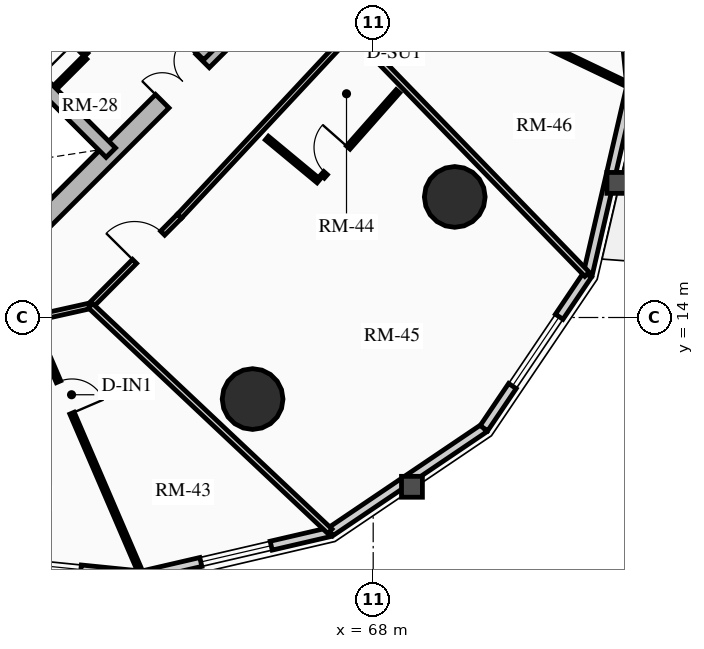
"""IFC4 building model, lengths in metres.
Left out: names, types, materials, properties, quantities, classifications, styles, units other than length and angle.
Written with IfcOpenShell. Run it as: python <this file> out.ifc"""

import sys

from ifc_helpers import new_model, si_unit, direction, frame, frame_2d, origin, origin_2d, place, context, subcontext, project, spatial, rectangle, circle, extrude, source, transform, mapped, element, fill, save


model = new_model("IFC4")
c1 = context("Model", 3, precision=1e-05, world=origin(), true_north=direction((0.0, 1.0)))
c2 = subcontext(c1, "Body", "Model", "MODEL_VIEW")
j1 = project(units=[si_unit("LENGTHUNIT", "METRE"), si_unit("PLANEANGLEUNIT", "RADIAN")], contexts=[c1])
p1 = place(None, origin())
s1 = spatial("IfcSite", under=j1, at=p1, CompositionType="ELEMENT")
p2 = place(p1, origin())
s2 = spatial("IfcBuilding", under=s1, at=p2, CompositionType="ELEMENT")
p3 = place(p2, frame((0.0, 0.0, 33.64)))
s3 = spatial("IfcBuildingStorey", under=s2, at=p3, CompositionType="ELEMENT", Elevation=33.64)
p4 = place(p3, frame((58.596, 15.838, 0.0), z_axis=(0.0, 0.0, 1.0), x_axis=(0.707106781187, 0.707106781187, 0.0)))
e1 = element("IfcWall", 1, at=p4, inside=s3, PredefinedType="SHEAR", context=c2, shape_type="SweptSolid", body=[
    extrude(rectangle(XDim=10.7, YDim=0.5, at=frame_2d((5.35, 0.0))), origin(), (0.0, 0.0, 1.0), 2.91),
])
m1 = source(origin(), c2, "Body", "SweptSolid", [
    extrude(rectangle(XDim=1.5, YDim=2.02, at=frame_2d((0.75, 1.01))), frame((0.0, 0.26, 0.0), z_axis=(0.0, -1.0, 0.0), x_axis=(1.0, 0.0, 0.0)), (0.0, 0.0, 1.0), 0.52),
])
p5 = place(p4, frame((5.45, 0.0, 0.0)))
e2 = element("IfcOpeningElement", 2, at=p5, cuts=e1, PredefinedType="OPENING", context=c2, shape_type="MappedRepresentation", body=[
    mapped(m1, transform((0.0, 0.0, 0.0), x_axis=(1.0, 0.0, 0.0), y_axis=(0.0, 1.0, 0.0), z_axis=(0.0, 0.0, 1.0), scale=1.0)),
])
p6 = place(p3, frame((61.096, 18.338, 0.0), z_axis=(0.0, 0.0, 1.0), x_axis=(-0.707106781187, 0.707106781187, 0.0)))
e3 = element("IfcWall", 3, at=p6, inside=s3, PredefinedType="SHEAR", context=c2, shape_type="SweptSolid", body=[
    extrude(rectangle(XDim=13.8, YDim=0.35, at=frame_2d((6.9, 0.0))), origin(), (0.0, 0.0, 1.0), 2.91),
])
m2 = source(origin(), c2, "Body", "SweptSolid", [
    extrude(rectangle(XDim=1.1, YDim=2.015, at=frame_2d((0.55, 1.007))), frame((0.0, 0.185, 0.0), z_axis=(0.0, -1.0, 0.0), x_axis=(1.0, 0.0, 0.0)), (0.0, 0.0, 1.0), 0.37),
])
p7 = place(p6, frame((4.9, 0.0, 0.0)))
e4 = element("IfcOpeningElement", 4, at=p7, cuts=e3, PredefinedType="OPENING", context=c2, shape_type="MappedRepresentation", body=[
    mapped(m2, transform((0.0, 0.0, 0.0), x_axis=(1.0, 0.0, 0.0), y_axis=(0.0, 1.0, 0.0), z_axis=(0.0, 0.0, 1.0), scale=1.0)),
])
m3 = source(origin(), c2, "Body", "SweptSolid", [
    extrude(rectangle(XDim=1.15, YDim=2.02, at=frame_2d((0.575, 1.01))), frame((0.0, 0.185, 0.0), z_axis=(0.0, -1.0, 0.0), x_axis=(1.0, 0.0, 0.0)), (0.0, 0.0, 1.0), 0.37),
])
p8 = place(p6, frame((7.32, 0.0, 0.0)))
e5 = element("IfcOpeningElement", 5, at=p8, cuts=e3, PredefinedType="OPENING", context=c2, shape_type="MappedRepresentation", body=[
    mapped(m3, transform((0.0, 0.0, 0.0), x_axis=(1.0, 0.0, 0.0), y_axis=(0.0, 1.0, 0.0), z_axis=(0.0, 0.0, 1.0), scale=1.0)),
])
p9 = place(p3, frame((63.662, 20.904, 0.0), z_axis=(0.0, 0.0, 1.0), x_axis=(-0.707106781187, 0.707106781187, 0.0)))
e6 = element("IfcWall", 6, at=p9, inside=s3, PredefinedType="SHEAR", context=c2, shape_type="SweptSolid", body=[
    extrude(rectangle(XDim=13.8, YDim=0.35, at=frame_2d((6.9, 0.0))), origin(), (0.0, 0.0, 1.0), 2.91),
])
p10 = place(p9, frame((10.025, 0.0, 0.0)))
e7 = element("IfcOpeningElement", 7, at=p10, cuts=e6, PredefinedType="OPENING", context=c2, shape_type="MappedRepresentation", body=[
    mapped(m2, transform((0.0, 0.0, 0.0), x_axis=(1.0, 0.0, 0.0), y_axis=(0.0, 1.0, 0.0), z_axis=(0.0, 0.0, 1.0), scale=1.0)),
])
p11 = place(p9, frame((12.025, 0.0, 0.0)))
e8 = element("IfcOpeningElement", 8, at=p11, cuts=e6, PredefinedType="OPENING", context=c2, shape_type="MappedRepresentation", body=[
    mapped(m2, transform((0.0, 0.0, 0.0), x_axis=(1.0, 0.0, 0.0), y_axis=(0.0, 1.0, 0.0), z_axis=(0.0, 0.0, 1.0), scale=1.0)),
])
p12 = place(p9, frame((5.33, 0.0, 0.0)))
e9 = element("IfcOpeningElement", 9, at=p12, cuts=e6, PredefinedType="OPENING", context=c2, shape_type="MappedRepresentation", body=[
    mapped(m3, transform((0.0, 0.0, 0.0), x_axis=(1.0, 0.0, 0.0), y_axis=(0.0, 1.0, 0.0), z_axis=(0.0, 0.0, 1.0), scale=1.0)),
])
for number, where, z_axis, x_axis in (
    (10, (64.827, 11.854, 0.0), (0.0, 0.0, 1.0), (1.0, 0.0, 0.0)),
    (11, (70.146, 17.173, 0.0), (0.0, 0.0, 1.0), (1.0, 0.0, 0.0)),
):
    element("IfcColumn", number, at=place(p3, frame(where, z_axis=z_axis, x_axis=x_axis)), inside=s3, PredefinedType="USERDEFINED", context=c2, shape_type="SweptSolid", body=[
        extrude(circle(Radius=0.8, at=origin_2d()), origin(), (0.0, 0.0, 1.0), 2.91),
    ])
p13 = place(p3, frame((61.91, 7.206, 0.0), z_axis=(0.0, 0.0, 1.0), x_axis=(-0.994968263437, 0.100190592135, 0.0)))
e12 = element("IfcWall", 12, at=p13, inside=s3, PredefinedType="SOLIDWALL", context=c2, shape_type="SweptSolid", body=[
    extrude(rectangle(XDim=5.419, YDim=0.24, at=frame_2d((2.71, 0.0))), origin(), (0.0, 0.0, 1.0), 2.073),
])
m4 = source(origin(), c2, "Body", "SweptSolid", [
    extrude(rectangle(XDim=2.2, YDim=1.35, at=frame_2d((1.1, 0.675))), frame((0.0, 0.13, 0.0), z_axis=(0.0, -1.0, 0.0), x_axis=(1.0, 0.0, 0.0)), (0.0, 0.0, 1.0), 0.26),
])
p14 = place(p13, frame((1.61, 0.0, 0.65)))
e13 = element("IfcOpeningElement", 13, at=p14, cuts=e12, PredefinedType="OPENING", context=c2, shape_type="MappedRepresentation", body=[
    mapped(m4, transform((0.0, 0.0, 0.0), x_axis=(1.0, 0.0, 0.0), y_axis=(0.0, 1.0, 0.0), z_axis=(0.0, 0.0, 1.0), scale=1.0)),
])
p15 = place(p3, frame((66.871, 8.356, 0.0), z_axis=(0.0, 0.0, 1.0), x_axis=(-0.974167686491, -0.22582585901, 0.0)))
e14 = element("IfcWall", 14, at=p15, inside=s3, PredefinedType="SOLIDWALL", context=c2, shape_type="SweptSolid", body=[
    extrude(rectangle(XDim=5.092, YDim=0.24, at=frame_2d((2.546, 0.0))), origin(), (0.0, 0.0, 1.0), 2.073),
])
m5 = source(origin(), c2, "Body", "SweptSolid", [
    extrude(rectangle(XDim=1.9, YDim=1.35, at=frame_2d((0.95, 0.675))), frame((0.0, 0.13, 0.0), z_axis=(0.0, -1.0, 0.0), x_axis=(1.0, 0.0, 0.0)), (0.0, 0.0, 1.0), 0.26),
])
p16 = place(p15, frame((1.596, 0.0, 0.65)))
e15 = element("IfcOpeningElement", 15, at=p16, cuts=e14, PredefinedType="OPENING", context=c2, shape_type="MappedRepresentation", body=[
    mapped(m5, transform((0.0, 0.0, 0.0), x_axis=(1.0, 0.0, 0.0), y_axis=(0.0, 1.0, 0.0), z_axis=(0.0, 0.0, 1.0), scale=1.0)),
])
p17 = place(p3, frame((70.914, 11.086, 0.0), z_axis=(0.0, 0.0, 1.0), x_axis=(-0.828748297084, -0.559621532896, 0.0)))
e16 = element("IfcWall", 16, at=p17, inside=s3, PredefinedType="SOLIDWALL", context=c2, shape_type="SweptSolid", body=[
    extrude(rectangle(XDim=4.879, YDim=0.24, at=frame_2d((2.439, 0.0))), origin(), (0.0, 0.0, 1.0), 2.073),
])
p18 = place(p3, frame((73.644, 15.129, 0.0), z_axis=(0.0, 0.0, 1.0), x_axis=(-0.559621532896, -0.828748297084, 0.0)))
e17 = element("IfcWall", 17, at=p18, inside=s3, PredefinedType="SOLIDWALL", context=c2, shape_type="SweptSolid", body=[
    extrude(rectangle(XDim=4.879, YDim=0.24, at=frame_2d((2.439, 0.0))), origin(), (0.0, 0.0, 1.0), 2.073),
])
p19 = place(p18, frame((1.339, 0.0, 0.65)))
e18 = element("IfcOpeningElement", 18, at=p19, cuts=e17, PredefinedType="OPENING", context=c2, shape_type="MappedRepresentation", body=[
    mapped(m4, transform((0.0, 0.0, 0.0), x_axis=(1.0, 0.0, 0.0), y_axis=(0.0, 1.0, 0.0), z_axis=(0.0, 0.0, 1.0), scale=1.0)),
])
p20 = place(p3, frame((74.794, 20.09, 0.0), z_axis=(0.0, 0.0, 1.0), x_axis=(-0.22582585901, -0.974167686491, 0.0)))
e19 = element("IfcWall", 19, at=p20, inside=s3, PredefinedType="SOLIDWALL", context=c2, shape_type="SweptSolid", body=[
    extrude(rectangle(XDim=5.092, YDim=0.24, at=frame_2d((2.546, 0.0))), origin(), (0.0, 0.0, 1.0), 2.073),
])
p21 = place(p3, frame((74.251, 25.482, 0.0), z_axis=(0.0, 0.0, 1.0), x_axis=(0.100190592135, -0.994968263437, 0.0)))
e20 = element("IfcWall", 20, at=p21, inside=s3, PredefinedType="SOLIDWALL", context=c2, shape_type="SweptSolid", body=[
    extrude(rectangle(XDim=5.419, YDim=0.24, at=frame_2d((2.71, 0.0))), origin(), (0.0, 0.0, 1.0), 2.073),
])
p22 = place(p21, frame((1.76, 0.0, 0.65)))
e21 = element("IfcOpeningElement", 21, at=p22, cuts=e20, PredefinedType="OPENING", context=c2, shape_type="MappedRepresentation", body=[
    mapped(m5, transform((0.0, 0.0, 0.0), x_axis=(1.0, 0.0, 0.0), y_axis=(0.0, 1.0, 0.0), z_axis=(0.0, 0.0, 1.0), scale=1.0)),
])
p23 = place(p3, frame((60.448, 20.915, 0.0), z_axis=(0.0, 0.0, 1.0), x_axis=(-0.707106781187, 0.707106781187, 0.0)))
e22 = element("IfcWall", 22, at=p23, inside=s3, PredefinedType="PARTITIONING", context=c2, shape_type="SweptSolid", body=[
    extrude(rectangle(XDim=1.87, YDim=0.125, at=frame_2d((0.935, 0.0))), origin(), (0.0, 0.0, 1.0), 2.635),
])
m6 = source(origin(), c2, "Body", "SweptSolid", [
    extrude(rectangle(XDim=0.9, YDim=2.005, at=frame_2d((0.45, 1.002))), frame((0.0, 0.073, 0.0), z_axis=(0.0, -1.0, 0.0), x_axis=(1.0, 0.0, 0.0)), (0.0, 0.0, 1.0), 0.145),
])
p24 = place(p23, frame((0.45, 0.0, 0.0)))
e23 = element("IfcOpeningElement", 23, at=p24, cuts=e22, PredefinedType="OPENING", context=c2, shape_type="MappedRepresentation", body=[
    mapped(m6, transform((0.0, 0.0, 0.0), x_axis=(1.0, 0.0, 0.0), y_axis=(0.0, 1.0, 0.0), z_axis=(0.0, 0.0, 1.0), scale=1.0)),
])
p25 = place(p3, frame((59.643, 20.066, 0.0), z_axis=(0.0, 0.0, 1.0), x_axis=(0.707106781187, 0.707106781187, 0.0)))
e24 = element("IfcWall", 24, at=p25, inside=s3, PredefinedType="PARTITIONING", context=c2, shape_type="SweptSolid", body=[
    extrude(rectangle(XDim=1.1, YDim=0.125, at=frame_2d((0.55, 0.0))), origin(), (0.0, 0.0, 1.0), 2.635),
])
p26 = place(p3, frame((59.008, 13.963, 0.0), z_axis=(0.0, 0.0, 1.0), x_axis=(0.976020856791, 0.21767702476, 0.0)))
e25 = element("IfcWall", 25, at=p26, inside=s3, PredefinedType="PARTITIONING", context=c2, shape_type="SweptSolid", body=[
    extrude(rectangle(XDim=1.593, YDim=0.15, at=frame_2d((0.796, 0.0))), origin(), (0.0, 0.0, 1.0), 2.205),
])
p27 = place(p3, frame((60.562, 14.31, 0.0), z_axis=(0.0, 0.0, 1.0), x_axis=(0.704566236161, 0.709638230975, 0.0)))
e26 = element("IfcWall", 26, at=p27, inside=s3, PredefinedType="PARTITIONING", context=c2, shape_type="SweptSolid", body=[
    extrude(rectangle(XDim=3.321, YDim=0.15, at=frame_2d((1.661, 0.0))), origin(), (0.0, 0.0, 1.0), 2.159),
])
m7 = source(origin(), c2, "Body", "SweptSolid", [
    extrude(rectangle(XDim=1.05, YDim=2.015, at=frame_2d((0.525, 1.007))), frame((0.0, 0.085, 0.0), z_axis=(0.0, -1.0, 0.0), x_axis=(1.0, 0.0, 0.0)), (0.0, 0.0, 1.0), 0.17),
])
p28 = place(p27, frame((1.643, 0.0, 0.0)))
e27 = element("IfcOpeningElement", 27, at=p28, cuts=e26, PredefinedType="OPENING", context=c2, shape_type="MappedRepresentation", body=[
    mapped(m7, transform((0.0, 0.0, 0.0), x_axis=(1.0, 0.0, 0.0), y_axis=(0.0, 1.0, 0.0), z_axis=(0.0, 0.0, 1.0), scale=1.0)),
])
p29 = place(p3, frame((62.903, 16.667, 0.0), z_axis=(0.0, 0.0, 1.0), x_axis=(0.682371947497, 0.731005147225, 0.0)))
e28 = element("IfcWall", 28, at=p29, inside=s3, PredefinedType="PARTITIONING", context=c2, shape_type="SweptSolid", body=[
    extrude(rectangle(XDim=6.642, YDim=0.15, at=frame_2d((3.321, 0.0))), origin(), (0.0, 0.0, 1.0), 2.159),
])
p30 = place(p3, frame((60.562, 14.31, 0.0), z_axis=(0.0, 0.0, 1.0), x_axis=(0.727781661561, -0.685808904211, 0.0)))
e29 = element("IfcWall", 29, at=p30, inside=s3, PredefinedType="PARTITIONING", context=c2, shape_type="SweptSolid", body=[
    extrude(rectangle(XDim=8.655, YDim=0.16, at=frame_2d((4.328, 0.0))), origin(), (0.0, 0.0, 1.0), 2.073),
])
p31 = place(p3, frame((67.435, 21.521, 0.0), z_axis=(0.0, 0.0, 1.0), x_axis=(0.6962628802, -0.717786877601, 0.0)))
e30 = element("IfcWall", 30, at=p31, inside=s3, PredefinedType="PARTITIONING", context=c2, shape_type="SweptSolid", body=[
    extrude(rectangle(XDim=8.893, YDim=0.16, at=frame_2d((4.446, 0.0))), origin(), (0.0, 0.0, 1.0), 2.073),
])
p32 = place(p3, frame((59.008, 13.963, 0.0), z_axis=(0.0, 0.0, 1.0), x_axis=(0.395256697593, -0.918570706592, 0.0)))
e31 = element("IfcWall", 31, at=p32, inside=s3, PredefinedType="PARTITIONING", context=c2, shape_type="SweptSolid", body=[
    extrude(rectangle(XDim=7.334, YDim=0.125, at=frame_2d((3.667, 0.0))), origin(), (0.0, 0.0, 1.0), 2.073),
])
p33 = place(p32, frame((1.8, 0.0, 0.0)))
e32 = element("IfcOpeningElement", 32, at=p33, cuts=e31, PredefinedType="OPENING", context=c2, shape_type="MappedRepresentation", body=[
    mapped(m6, transform((0.0, 0.0, 0.0), x_axis=(1.0, 0.0, 0.0), y_axis=(0.0, 1.0, 0.0), z_axis=(0.0, 0.0, 1.0), scale=1.0)),
])
p34 = place(p3, frame((65.202, 18.721, 0.0), z_axis=(0.0, 0.0, 1.0), x_axis=(0.769814202386, -0.638268042287, 0.0)))
e33 = element("IfcWall", 33, at=p34, inside=s3, PredefinedType="PARTITIONING", context=c2, shape_type="SweptSolid", body=[
    extrude(rectangle(XDim=1.769, YDim=0.125, at=frame_2d((0.884, 0.0))), origin(), (0.0, 0.0, 1.0), 2.635),
])
p35 = place(p3, frame((66.667, 17.709, 0.0), z_axis=(0.0, 0.0, 1.0), x_axis=(0.662510581678, 0.749052554341, 0.0)))
e34 = element("IfcWall", 34, at=p35, inside=s3, PredefinedType="PARTITIONING", context=c2, shape_type="SweptSolid", body=[
    extrude(rectangle(XDim=2.996, YDim=0.125, at=frame_2d((1.498, 0.0))), origin(), (0.0, 0.0, 1.0), 2.159),
])
p36 = place(p35, frame((0.12, 0.0, 0.0)))
e35 = element("IfcOpeningElement", 35, at=p36, cuts=e34, PredefinedType="OPENING", context=c2, shape_type="MappedRepresentation", body=[
    mapped(m6, transform((0.0, 0.0, 0.0), x_axis=(1.0, 0.0, 0.0), y_axis=(0.0, 1.0, 0.0), z_axis=(0.0, 0.0, 1.0), scale=1.0)),
])
p37 = place(p3, frame((68.456, 23.11, 0.0), z_axis=(0.0, 0.0, 1.0), x_axis=(0.902430819297, -0.430834790125, 0.0)))
e36 = element("IfcWall", 36, at=p37, inside=s3, PredefinedType="PARTITIONING", context=c2, shape_type="SweptSolid", body=[
    extrude(rectangle(XDim=7.002, YDim=0.125, at=frame_2d((3.501, 0.0))), origin(), (0.0, 0.0, 1.0), 2.073),
])
p38 = place(p37, frame((1.8, 0.0, 0.0)))
e37 = element("IfcOpeningElement", 37, at=p38, cuts=e36, PredefinedType="OPENING", context=c2, shape_type="MappedRepresentation", body=[
    mapped(m6, transform((0.0, 0.0, 0.0), x_axis=(1.0, 0.0, 0.0), y_axis=(0.0, 1.0, 0.0), z_axis=(0.0, 0.0, 1.0), scale=1.0)),
])
m8 = source(origin(), c2, "Body", "SweptSolid", [
    extrude(rectangle(XDim=2.2, YDim=1.35, at=frame_2d((1.1, 0.675))), frame((0.0, 0.03, 0.0), z_axis=(0.0, -1.0, 0.0), x_axis=(1.0, 0.0, 0.0)), (0.0, 0.0, 1.0), 0.06),
])
p39 = place(p14, origin())
e38 = element("IfcWindow", 38, at=p39, inside=s3, PartitioningType="DOUBLE_PANEL_VERTICAL", PredefinedType="WINDOW", context=c2, shape_type="MappedRepresentation", body=[
    mapped(m8, transform((0.0, 0.0, 0.0), x_axis=(1.0, 0.0, 0.0), y_axis=(0.0, 1.0, 0.0), z_axis=(0.0, 0.0, 1.0), scale=1.0)),
])
fill(e13, e38)
m9 = source(origin(), c2, "Body", "SweptSolid", [
    extrude(rectangle(XDim=1.9, YDim=1.35, at=frame_2d((0.95, 0.675))), frame((0.0, 0.03, 0.0), z_axis=(0.0, -1.0, 0.0), x_axis=(1.0, 0.0, 0.0)), (0.0, 0.0, 1.0), 0.06),
])
p40 = place(p16, origin())
e39 = element("IfcWindow", 39, at=p40, inside=s3, PartitioningType="DOUBLE_PANEL_VERTICAL", PredefinedType="WINDOW", context=c2, shape_type="MappedRepresentation", body=[
    mapped(m9, transform((0.0, 0.0, 0.0), x_axis=(1.0, 0.0, 0.0), y_axis=(0.0, 1.0, 0.0), z_axis=(0.0, 0.0, 1.0), scale=1.0)),
])
fill(e15, e39)
p41 = place(p19, origin())
e40 = element("IfcWindow", 40, at=p41, inside=s3, PartitioningType="DOUBLE_PANEL_VERTICAL", PredefinedType="WINDOW", context=c2, shape_type="MappedRepresentation", body=[
    mapped(m8, transform((0.0, 0.0, 0.0), x_axis=(1.0, 0.0, 0.0), y_axis=(0.0, 1.0, 0.0), z_axis=(0.0, 0.0, 1.0), scale=1.0)),
])
fill(e18, e40)
m10 = source(origin(), c2, "Body", "SweptSolid", [
    extrude(rectangle(XDim=1.5, YDim=2.02, at=frame_2d((0.75, 1.01))), frame((0.0, 0.025, 0.0), z_axis=(0.0, -1.0, 0.0), x_axis=(1.0, 0.0, 0.0)), (0.0, 0.0, 1.0), 0.05),
])
p42 = place(p5, origin())
e41 = element("IfcDoor", 41, at=p42, inside=s3, OperationType="DOUBLE_DOOR_SINGLE_SWING", PredefinedType="DOOR", context=c2, shape_type="MappedRepresentation", body=[
    mapped(m10, transform((0.0, 0.0, 0.0), x_axis=(1.0, 0.0, 0.0), y_axis=(0.0, 1.0, 0.0), z_axis=(0.0, 0.0, 1.0), scale=1.0)),
])
fill(e2, e41)
m11 = source(origin(), c2, "Body", "SweptSolid", [
    extrude(rectangle(XDim=0.9, YDim=2.005, at=frame_2d((0.45, 1.002))), frame((0.0, 0.025, 0.0), z_axis=(0.0, -1.0, 0.0), x_axis=(1.0, 0.0, 0.0)), (0.0, 0.0, 1.0), 0.05),
])
p43 = place(p33, origin())
e42 = element("IfcDoor", 42, at=p43, inside=s3, OperationType="SINGLE_SWING_RIGHT", PredefinedType="DOOR", context=c2, shape_type="MappedRepresentation", body=[
    mapped(m11, transform((0.0, 0.0, 0.0), x_axis=(1.0, 0.0, 0.0), y_axis=(0.0, 1.0, 0.0), z_axis=(0.0, 0.0, 1.0), scale=1.0)),
])
fill(e32, e42)
m12 = source(origin(), c2, "Body", "SweptSolid", [
    extrude(rectangle(XDim=1.05, YDim=2.015, at=frame_2d((0.525, 1.007))), frame((0.0, 0.025, 0.0), z_axis=(0.0, -1.0, 0.0), x_axis=(1.0, 0.0, 0.0)), (0.0, 0.0, 1.0), 0.05),
])
p44 = place(p28, origin())
e43 = element("IfcDoor", 43, at=p44, inside=s3, OperationType="SINGLE_SWING_LEFT", PredefinedType="DOOR", context=c2, shape_type="MappedRepresentation", body=[
    mapped(m12, transform((0.0, 0.0, 0.0), x_axis=(1.0, 0.0, 0.0), y_axis=(0.0, 1.0, 0.0), z_axis=(0.0, 0.0, 1.0), scale=1.0)),
])
fill(e27, e43)
p45 = place(p36, origin())
e44 = element("IfcDoor", 44, at=p45, inside=s3, OperationType="SINGLE_SWING_RIGHT", PredefinedType="DOOR", context=c2, shape_type="MappedRepresentation", body=[
    mapped(m11, transform((0.0, 0.0, 0.0), x_axis=(1.0, 0.0, 0.0), y_axis=(0.0, 1.0, 0.0), z_axis=(0.0, 0.0, 1.0), scale=1.0)),
])
fill(e35, e44)
save(model, sys.argv[1])
